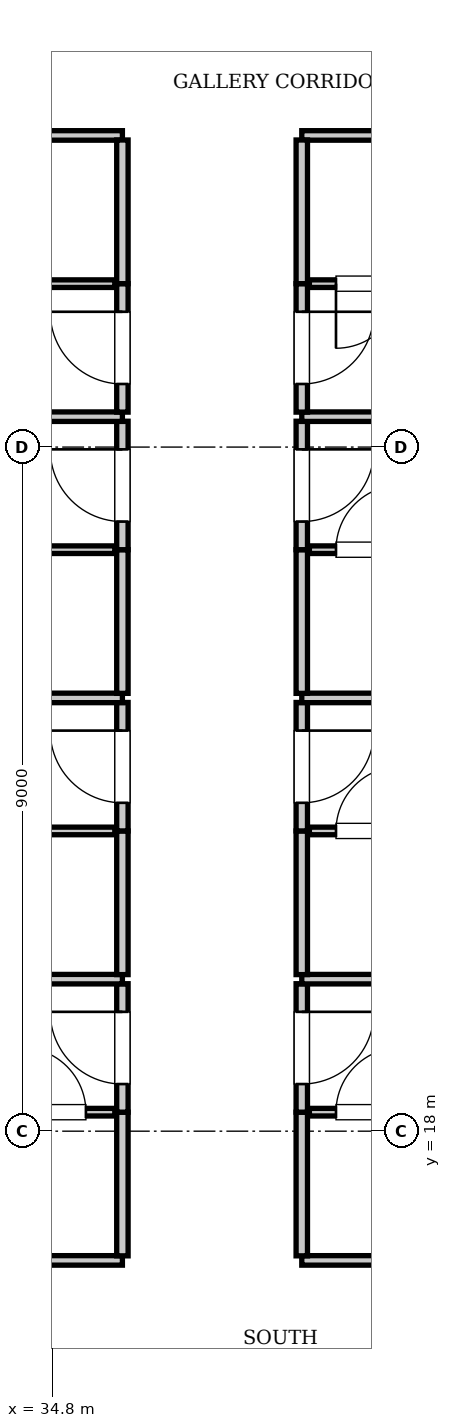
"""IFC4 building model, lengths in metres.
Left out: names, types, materials, properties, quantities, classifications, styles, units other than length and angle.
Written with IfcOpenShell. Run it as: python <this file> out.ifc"""

import sys

from ifc_helpers import new_model, si_unit, direction, frame, frame_2d, origin, place, context, subcontext, project, spatial, rectangle, extrude, element, fill, save


model = new_model("IFC4")
c1 = context("Model", 3, precision=1e-05, world=origin(), true_north=direction((0.0, 1.0)))
c2 = subcontext(c1, "Body", "Model", "MODEL_VIEW")
j1 = project(units=[si_unit("LENGTHUNIT", "METRE"), si_unit("PLANEANGLEUNIT", "RADIAN")], contexts=[c1])
p1 = place(None, origin())
s1 = spatial("IfcSite", under=j1, at=p1, CompositionType="ELEMENT")
p2 = place(p1, origin())
s2 = spatial("IfcBuilding", under=s1, at=p2, CompositionType="ELEMENT")
p3 = place(p2, frame((0.0, 0.0, 185.15)))
s3 = spatial("IfcBuildingStorey", under=s2, at=p3, CompositionType="ELEMENT", Elevation=185.15)
p4 = place(p3, frame((13.2, 16.3, 0.0), z_axis=(0.0, 0.0, 1.0), x_axis=(1.0, 0.0, 0.0)))
e1 = element("IfcWall", 1, at=p4, inside=s3, PredefinedType="PARTITIONING", context=c2, shape_type="SweptSolid", body=[
    extrude(rectangle(XDim=22.52, YDim=0.125, at=frame_2d((11.26, 0.0))), origin(), (0.0, 0.0, 1.0), 3.61),
])
p5 = place(p3, frame((38.08, 16.3, 0.0), z_axis=(0.0, 0.0, 1.0), x_axis=(1.0, 0.0, 0.0)))
e2 = element("IfcWall", 2, at=p5, inside=s3, PredefinedType="PARTITIONING", context=c2, shape_type="SweptSolid", body=[
    extrude(rectangle(XDim=24.32, YDim=0.125, at=frame_2d((12.16, 0.0))), origin(), (0.0, 0.0, 1.0), 3.61),
])
p6 = place(p3, frame((13.2, 31.1, 0.0), z_axis=(0.0, 0.0, 1.0), x_axis=(1.0, 0.0, 0.0)))
e3 = element("IfcWall", 3, at=p6, inside=s3, PredefinedType="PARTITIONING", context=c2, shape_type="SweptSolid", body=[
    extrude(rectangle(XDim=22.52, YDim=0.125, at=frame_2d((11.26, 0.0))), origin(), (0.0, 0.0, 1.0), 3.61),
])
p7 = place(p3, frame((38.08, 31.1, 0.0), z_axis=(0.0, 0.0, 1.0), x_axis=(1.0, 0.0, 0.0)))
e4 = element("IfcWall", 4, at=p7, inside=s3, PredefinedType="PARTITIONING", context=c2, shape_type="SweptSolid", body=[
    extrude(rectangle(XDim=24.32, YDim=0.125, at=frame_2d((12.16, 0.0))), origin(), (0.0, 0.0, 1.0), 3.61),
])
p8 = place(p3, frame((35.72, 16.36, 0.0), z_axis=(0.0, 0.0, 1.0), x_axis=(0.0, 1.0, 0.0)))
e5 = element("IfcWall", 5, at=p8, inside=s3, PredefinedType="PARTITIONING", context=c2, shape_type="SweptSolid", body=[
    extrude(rectangle(XDim=1.89, YDim=0.15, at=frame_2d((0.945, 0.0))), origin(), (0.0, 0.0, 1.0), 3.61),
])
p9 = place(p3, frame((35.72, 18.25, 0.0), z_axis=(0.0, 0.0, 1.0), x_axis=(0.0, 1.0, 0.0)))
e6 = element("IfcWall", 6, at=p9, inside=s3, PredefinedType="PARTITIONING", context=c2, shape_type="SweptSolid", body=[
    extrude(rectangle(XDim=1.69, YDim=0.15, at=frame_2d((0.845, 0.0))), origin(), (0.0, 0.0, 1.0), 3.61),
])
p10 = place(p9, frame((0.37, 0.0, 0.0)))
e7 = element("IfcOpeningElement", 7, at=p10, cuts=e6, PredefinedType="OPENING", context=c2, shape_type="SweptSolid", body=[
    extrude(rectangle(XDim=0.95, YDim=2.15, at=frame_2d((0.475, 1.075))), frame((0.0, 0.085, 0.0), z_axis=(0.0, -1.0, 0.0), x_axis=(1.0, 0.0, 0.0)), (0.0, 0.0, 1.0), 0.17),
])
p11 = place(p3, frame((33.32, 18.25, 0.0), z_axis=(0.0, 0.0, 1.0), x_axis=(1.0, 0.0, 0.0)))
e8 = element("IfcWall", 8, at=p11, inside=s3, PredefinedType="PARTITIONING", context=c2, shape_type="SweptSolid", body=[
    extrude(rectangle(XDim=2.3, YDim=0.1, at=frame_2d((1.15, 0.0))), origin(), (0.0, 0.0, 1.0), 3.61),
])
p12 = place(p11, frame((1.07, 0.0, 0.0)))
e9 = element("IfcOpeningElement", 9, at=p12, cuts=e8, PredefinedType="OPENING", context=c2, shape_type="SweptSolid", body=[
    extrude(rectangle(XDim=0.85, YDim=2.1, at=frame_2d((0.425, 1.05))), frame((0.0, 0.06, 0.0), z_axis=(0.0, -1.0, 0.0), x_axis=(1.0, 0.0, 0.0)), (0.0, 0.0, 1.0), 0.12),
])
p13 = place(p3, frame((38.08, 16.36, 0.0), z_axis=(0.0, 0.0, 1.0), x_axis=(0.0, 1.0, 0.0)))
e10 = element("IfcWall", 10, at=p13, inside=s3, PredefinedType="PARTITIONING", context=c2, shape_type="SweptSolid", body=[
    extrude(rectangle(XDim=1.89, YDim=0.15, at=frame_2d((0.945, 0.0))), origin(), (0.0, 0.0, 1.0), 3.61),
])
p14 = place(p3, frame((38.08, 18.25, 0.0), z_axis=(0.0, 0.0, 1.0), x_axis=(0.0, 1.0, 0.0)))
e11 = element("IfcWall", 11, at=p14, inside=s3, PredefinedType="PARTITIONING", context=c2, shape_type="SweptSolid", body=[
    extrude(rectangle(XDim=1.69, YDim=0.15, at=frame_2d((0.845, 0.0))), origin(), (0.0, 0.0, 1.0), 3.61),
])
p15 = place(p14, frame((0.37, 0.0, 0.0)))
e12 = element("IfcOpeningElement", 12, at=p15, cuts=e11, PredefinedType="OPENING", context=c2, shape_type="SweptSolid", body=[
    extrude(rectangle(XDim=0.95, YDim=2.15, at=frame_2d((0.475, 1.075))), frame((0.0, 0.085, 0.0), z_axis=(0.0, -1.0, 0.0), x_axis=(1.0, 0.0, 0.0)), (0.0, 0.0, 1.0), 0.17),
])
p16 = place(p3, frame((38.18, 18.25, 0.0), z_axis=(0.0, 0.0, 1.0), x_axis=(1.0, 0.0, 0.0)))
e13 = element("IfcWall", 13, at=p16, inside=s3, PredefinedType="PARTITIONING", context=c2, shape_type="SweptSolid", body=[
    extrude(rectangle(XDim=2.3, YDim=0.1, at=frame_2d((1.15, 0.0))), origin(), (0.0, 0.0, 1.0), 3.61),
])
p17 = place(p16, frame((0.35, 0.0, 0.0)))
e14 = element("IfcOpeningElement", 14, at=p17, cuts=e13, PredefinedType="OPENING", context=c2, shape_type="SweptSolid", body=[
    extrude(rectangle(XDim=0.85, YDim=2.1, at=frame_2d((0.425, 1.05))), frame((0.0, 0.06, 0.0), z_axis=(0.0, -1.0, 0.0), x_axis=(1.0, 0.0, 0.0)), (0.0, 0.0, 1.0), 0.12),
])
p18 = place(p3, frame((13.2, 20.0, 0.0), z_axis=(0.0, 0.0, 1.0), x_axis=(1.0, 0.0, 0.0)))
e15 = element("IfcWall", 15, at=p18, inside=s3, PredefinedType="PARTITIONING", context=c2, shape_type="SweptSolid", body=[
    extrude(rectangle(XDim=22.52, YDim=0.125, at=frame_2d((11.26, 0.0))), origin(), (0.0, 0.0, 1.0), 3.61),
])
p19 = place(p3, frame((38.08, 20.0, 0.0), z_axis=(0.0, 0.0, 1.0), x_axis=(1.0, 0.0, 0.0)))
e16 = element("IfcWall", 16, at=p19, inside=s3, PredefinedType="PARTITIONING", context=c2, shape_type="SweptSolid", body=[
    extrude(rectangle(XDim=24.32, YDim=0.125, at=frame_2d((12.16, 0.0))), origin(), (0.0, 0.0, 1.0), 3.61),
])
p20 = place(p3, frame((35.72, 20.06, 0.0), z_axis=(0.0, 0.0, 1.0), x_axis=(0.0, 1.0, 0.0)))
e17 = element("IfcWall", 17, at=p20, inside=s3, PredefinedType="PARTITIONING", context=c2, shape_type="SweptSolid", body=[
    extrude(rectangle(XDim=1.89, YDim=0.15, at=frame_2d((0.945, 0.0))), origin(), (0.0, 0.0, 1.0), 3.61),
])
p21 = place(p3, frame((35.72, 21.95, 0.0), z_axis=(0.0, 0.0, 1.0), x_axis=(0.0, 1.0, 0.0)))
e18 = element("IfcWall", 18, at=p21, inside=s3, PredefinedType="PARTITIONING", context=c2, shape_type="SweptSolid", body=[
    extrude(rectangle(XDim=1.69, YDim=0.15, at=frame_2d((0.845, 0.0))), origin(), (0.0, 0.0, 1.0), 3.61),
])
p22 = place(p21, frame((0.37, 0.0, 0.0)))
e19 = element("IfcOpeningElement", 19, at=p22, cuts=e18, PredefinedType="OPENING", context=c2, shape_type="SweptSolid", body=[
    extrude(rectangle(XDim=0.95, YDim=2.15, at=frame_2d((0.475, 1.075))), frame((0.0, 0.085, 0.0), z_axis=(0.0, -1.0, 0.0), x_axis=(1.0, 0.0, 0.0)), (0.0, 0.0, 1.0), 0.17),
])
p23 = place(p3, frame((33.32, 21.95, 0.0), z_axis=(0.0, 0.0, 1.0), x_axis=(1.0, 0.0, 0.0)))
e20 = element("IfcWall", 20, at=p23, inside=s3, PredefinedType="PARTITIONING", context=c2, shape_type="SweptSolid", body=[
    extrude(rectangle(XDim=2.3, YDim=0.1, at=frame_2d((1.15, 0.0))), origin(), (0.0, 0.0, 1.0), 3.61),
])
p24 = place(p23, frame((0.35, 0.0, 0.0)))
e21 = element("IfcOpeningElement", 21, at=p24, cuts=e20, PredefinedType="OPENING", context=c2, shape_type="SweptSolid", body=[
    extrude(rectangle(XDim=0.85, YDim=2.1, at=frame_2d((0.425, 1.05))), frame((0.0, 0.06, 0.0), z_axis=(0.0, -1.0, 0.0), x_axis=(1.0, 0.0, 0.0)), (0.0, 0.0, 1.0), 0.12),
])
p25 = place(p3, frame((38.08, 20.06, 0.0), z_axis=(0.0, 0.0, 1.0), x_axis=(0.0, 1.0, 0.0)))
e22 = element("IfcWall", 22, at=p25, inside=s3, PredefinedType="PARTITIONING", context=c2, shape_type="SweptSolid", body=[
    extrude(rectangle(XDim=1.89, YDim=0.15, at=frame_2d((0.945, 0.0))), origin(), (0.0, 0.0, 1.0), 3.61),
])
p26 = place(p3, frame((38.08, 21.95, 0.0), z_axis=(0.0, 0.0, 1.0), x_axis=(0.0, 1.0, 0.0)))
e23 = element("IfcWall", 23, at=p26, inside=s3, PredefinedType="PARTITIONING", context=c2, shape_type="SweptSolid", body=[
    extrude(rectangle(XDim=1.69, YDim=0.15, at=frame_2d((0.845, 0.0))), origin(), (0.0, 0.0, 1.0), 3.61),
])
p27 = place(p26, frame((0.37, 0.0, 0.0)))
e24 = element("IfcOpeningElement", 24, at=p27, cuts=e23, PredefinedType="OPENING", context=c2, shape_type="SweptSolid", body=[
    extrude(rectangle(XDim=0.95, YDim=2.15, at=frame_2d((0.475, 1.075))), frame((0.0, 0.085, 0.0), z_axis=(0.0, -1.0, 0.0), x_axis=(1.0, 0.0, 0.0)), (0.0, 0.0, 1.0), 0.17),
])
p28 = place(p3, frame((38.18, 21.95, 0.0), z_axis=(0.0, 0.0, 1.0), x_axis=(1.0, 0.0, 0.0)))
e25 = element("IfcWall", 25, at=p28, inside=s3, PredefinedType="PARTITIONING", context=c2, shape_type="SweptSolid", body=[
    extrude(rectangle(XDim=2.3, YDim=0.1, at=frame_2d((1.15, 0.0))), origin(), (0.0, 0.0, 1.0), 3.61),
])
p29 = place(p28, frame((0.35, 0.0, 0.0)))
e26 = element("IfcOpeningElement", 26, at=p29, cuts=e25, PredefinedType="OPENING", context=c2, shape_type="SweptSolid", body=[
    extrude(rectangle(XDim=0.85, YDim=2.1, at=frame_2d((0.425, 1.05))), frame((0.0, 0.06, 0.0), z_axis=(0.0, -1.0, 0.0), x_axis=(1.0, 0.0, 0.0)), (0.0, 0.0, 1.0), 0.12),
])
p30 = place(p3, frame((13.2, 23.7, 0.0), z_axis=(0.0, 0.0, 1.0), x_axis=(1.0, 0.0, 0.0)))
e27 = element("IfcWall", 27, at=p30, inside=s3, PredefinedType="PARTITIONING", context=c2, shape_type="SweptSolid", body=[
    extrude(rectangle(XDim=22.52, YDim=0.125, at=frame_2d((11.26, 0.0))), origin(), (0.0, 0.0, 1.0), 3.61),
])
p31 = place(p3, frame((38.08, 23.7, 0.0), z_axis=(0.0, 0.0, 1.0), x_axis=(1.0, 0.0, 0.0)))
e28 = element("IfcWall", 28, at=p31, inside=s3, PredefinedType="PARTITIONING", context=c2, shape_type="SweptSolid", body=[
    extrude(rectangle(XDim=24.32, YDim=0.125, at=frame_2d((12.16, 0.0))), origin(), (0.0, 0.0, 1.0), 3.61),
])
p32 = place(p3, frame((35.72, 23.76, 0.0), z_axis=(0.0, 0.0, 1.0), x_axis=(0.0, 1.0, 0.0)))
e29 = element("IfcWall", 29, at=p32, inside=s3, PredefinedType="PARTITIONING", context=c2, shape_type="SweptSolid", body=[
    extrude(rectangle(XDim=1.89, YDim=0.15, at=frame_2d((0.945, 0.0))), origin(), (0.0, 0.0, 1.0), 3.61),
])
p33 = place(p3, frame((35.72, 25.65, 0.0), z_axis=(0.0, 0.0, 1.0), x_axis=(0.0, 1.0, 0.0)))
e30 = element("IfcWall", 30, at=p33, inside=s3, PredefinedType="PARTITIONING", context=c2, shape_type="SweptSolid", body=[
    extrude(rectangle(XDim=1.69, YDim=0.15, at=frame_2d((0.845, 0.0))), origin(), (0.0, 0.0, 1.0), 3.61),
])
p34 = place(p33, frame((0.37, 0.0, 0.0)))
e31 = element("IfcOpeningElement", 31, at=p34, cuts=e30, PredefinedType="OPENING", context=c2, shape_type="SweptSolid", body=[
    extrude(rectangle(XDim=0.95, YDim=2.15, at=frame_2d((0.475, 1.075))), frame((0.0, 0.085, 0.0), z_axis=(0.0, -1.0, 0.0), x_axis=(1.0, 0.0, 0.0)), (0.0, 0.0, 1.0), 0.17),
])
p35 = place(p3, frame((33.32, 25.65, 0.0), z_axis=(0.0, 0.0, 1.0), x_axis=(1.0, 0.0, 0.0)))
e32 = element("IfcWall", 32, at=p35, inside=s3, PredefinedType="PARTITIONING", context=c2, shape_type="SweptSolid", body=[
    extrude(rectangle(XDim=2.3, YDim=0.1, at=frame_2d((1.15, 0.0))), origin(), (0.0, 0.0, 1.0), 3.61),
])
p36 = place(p35, frame((0.35, 0.0, 0.0)))
e33 = element("IfcOpeningElement", 33, at=p36, cuts=e32, PredefinedType="OPENING", context=c2, shape_type="SweptSolid", body=[
    extrude(rectangle(XDim=0.85, YDim=2.1, at=frame_2d((0.425, 1.05))), frame((0.0, 0.06, 0.0), z_axis=(0.0, -1.0, 0.0), x_axis=(1.0, 0.0, 0.0)), (0.0, 0.0, 1.0), 0.12),
])
p37 = place(p3, frame((38.08, 23.76, 0.0), z_axis=(0.0, 0.0, 1.0), x_axis=(0.0, 1.0, 0.0)))
e34 = element("IfcWall", 34, at=p37, inside=s3, PredefinedType="PARTITIONING", context=c2, shape_type="SweptSolid", body=[
    extrude(rectangle(XDim=1.89, YDim=0.15, at=frame_2d((0.945, 0.0))), origin(), (0.0, 0.0, 1.0), 3.61),
])
p38 = place(p3, frame((38.08, 25.65, 0.0), z_axis=(0.0, 0.0, 1.0), x_axis=(0.0, 1.0, 0.0)))
e35 = element("IfcWall", 35, at=p38, inside=s3, PredefinedType="PARTITIONING", context=c2, shape_type="SweptSolid", body=[
    extrude(rectangle(XDim=1.69, YDim=0.15, at=frame_2d((0.845, 0.0))), origin(), (0.0, 0.0, 1.0), 3.61),
])
p39 = place(p38, frame((0.37, 0.0, 0.0)))
e36 = element("IfcOpeningElement", 36, at=p39, cuts=e35, PredefinedType="OPENING", context=c2, shape_type="SweptSolid", body=[
    extrude(rectangle(XDim=0.95, YDim=2.15, at=frame_2d((0.475, 1.075))), frame((0.0, 0.085, 0.0), z_axis=(0.0, -1.0, 0.0), x_axis=(1.0, 0.0, 0.0)), (0.0, 0.0, 1.0), 0.17),
])
p40 = place(p3, frame((38.18, 25.65, 0.0), z_axis=(0.0, 0.0, 1.0), x_axis=(1.0, 0.0, 0.0)))
e37 = element("IfcWall", 37, at=p40, inside=s3, PredefinedType="PARTITIONING", context=c2, shape_type="SweptSolid", body=[
    extrude(rectangle(XDim=2.3, YDim=0.1, at=frame_2d((1.15, 0.0))), origin(), (0.0, 0.0, 1.0), 3.61),
])
p41 = place(p40, frame((0.35, 0.0, 0.0)))
e38 = element("IfcOpeningElement", 38, at=p41, cuts=e37, PredefinedType="OPENING", context=c2, shape_type="SweptSolid", body=[
    extrude(rectangle(XDim=0.85, YDim=2.1, at=frame_2d((0.425, 1.05))), frame((0.0, 0.06, 0.0), z_axis=(0.0, -1.0, 0.0), x_axis=(1.0, 0.0, 0.0)), (0.0, 0.0, 1.0), 0.12),
])
p42 = place(p3, frame((13.2, 27.4, 0.0), z_axis=(0.0, 0.0, 1.0), x_axis=(1.0, 0.0, 0.0)))
e39 = element("IfcWall", 39, at=p42, inside=s3, PredefinedType="PARTITIONING", context=c2, shape_type="SweptSolid", body=[
    extrude(rectangle(XDim=22.52, YDim=0.125, at=frame_2d((11.26, 0.0))), origin(), (0.0, 0.0, 1.0), 3.61),
])
p43 = place(p3, frame((38.08, 27.4, 0.0), z_axis=(0.0, 0.0, 1.0), x_axis=(1.0, 0.0, 0.0)))
e40 = element("IfcWall", 40, at=p43, inside=s3, PredefinedType="PARTITIONING", context=c2, shape_type="SweptSolid", body=[
    extrude(rectangle(XDim=24.32, YDim=0.125, at=frame_2d((12.16, 0.0))), origin(), (0.0, 0.0, 1.0), 3.61),
])
p44 = place(p3, frame((35.72, 27.46, 0.0), z_axis=(0.0, 0.0, 1.0), x_axis=(0.0, 1.0, 0.0)))
e41 = element("IfcWall", 41, at=p44, inside=s3, PredefinedType="PARTITIONING", context=c2, shape_type="SweptSolid", body=[
    extrude(rectangle(XDim=1.69, YDim=0.15, at=frame_2d((0.845, 0.0))), origin(), (0.0, 0.0, 1.0), 3.61),
])
p45 = place(p44, frame((0.37, 0.0, 0.0)))
e42 = element("IfcOpeningElement", 42, at=p45, cuts=e41, PredefinedType="OPENING", context=c2, shape_type="SweptSolid", body=[
    extrude(rectangle(XDim=0.95, YDim=2.15, at=frame_2d((0.475, 1.075))), frame((0.0, 0.085, 0.0), z_axis=(0.0, -1.0, 0.0), x_axis=(1.0, 0.0, 0.0)), (0.0, 0.0, 1.0), 0.17),
])
p46 = place(p3, frame((35.72, 29.15, 0.0), z_axis=(0.0, 0.0, 1.0), x_axis=(0.0, 1.0, 0.0)))
e43 = element("IfcWall", 43, at=p46, inside=s3, PredefinedType="PARTITIONING", context=c2, shape_type="SweptSolid", body=[
    extrude(rectangle(XDim=1.89, YDim=0.15, at=frame_2d((0.945, 0.0))), origin(), (0.0, 0.0, 1.0), 3.61),
])
p47 = place(p3, frame((33.32, 29.15, 0.0), z_axis=(0.0, 0.0, 1.0), x_axis=(1.0, 0.0, 0.0)))
e44 = element("IfcWall", 44, at=p47, inside=s3, PredefinedType="PARTITIONING", context=c2, shape_type="SweptSolid", body=[
    extrude(rectangle(XDim=2.3, YDim=0.1, at=frame_2d((1.15, 0.0))), origin(), (0.0, 0.0, 1.0), 3.61),
])
p48 = place(p47, frame((0.35, 0.0, 0.0)))
e45 = element("IfcOpeningElement", 45, at=p48, cuts=e44, PredefinedType="OPENING", context=c2, shape_type="SweptSolid", body=[
    extrude(rectangle(XDim=0.85, YDim=2.1, at=frame_2d((0.425, 1.05))), frame((0.0, 0.06, 0.0), z_axis=(0.0, -1.0, 0.0), x_axis=(1.0, 0.0, 0.0)), (0.0, 0.0, 1.0), 0.12),
])
p49 = place(p3, frame((38.08, 27.46, 0.0), z_axis=(0.0, 0.0, 1.0), x_axis=(0.0, 1.0, 0.0)))
e46 = element("IfcWall", 46, at=p49, inside=s3, PredefinedType="PARTITIONING", context=c2, shape_type="SweptSolid", body=[
    extrude(rectangle(XDim=1.69, YDim=0.15, at=frame_2d((0.845, 0.0))), origin(), (0.0, 0.0, 1.0), 3.61),
])
p50 = place(p49, frame((0.37, 0.0, 0.0)))
e47 = element("IfcOpeningElement", 47, at=p50, cuts=e46, PredefinedType="OPENING", context=c2, shape_type="SweptSolid", body=[
    extrude(rectangle(XDim=0.95, YDim=2.15, at=frame_2d((0.475, 1.075))), frame((0.0, 0.085, 0.0), z_axis=(0.0, -1.0, 0.0), x_axis=(1.0, 0.0, 0.0)), (0.0, 0.0, 1.0), 0.17),
])
p51 = place(p3, frame((38.08, 29.15, 0.0), z_axis=(0.0, 0.0, 1.0), x_axis=(0.0, 1.0, 0.0)))
e48 = element("IfcWall", 48, at=p51, inside=s3, PredefinedType="PARTITIONING", context=c2, shape_type="SweptSolid", body=[
    extrude(rectangle(XDim=1.89, YDim=0.15, at=frame_2d((0.945, 0.0))), origin(), (0.0, 0.0, 1.0), 3.61),
])
p52 = place(p3, frame((38.18, 29.15, 0.0), z_axis=(0.0, 0.0, 1.0), x_axis=(1.0, 0.0, 0.0)))
e49 = element("IfcWall", 49, at=p52, inside=s3, PredefinedType="PARTITIONING", context=c2, shape_type="SweptSolid", body=[
    extrude(rectangle(XDim=2.3, YDim=0.1, at=frame_2d((1.15, 0.0))), origin(), (0.0, 0.0, 1.0), 3.61),
])
p53 = place(p52, frame((0.35, 0.0, 0.0)))
e50 = element("IfcOpeningElement", 50, at=p53, cuts=e49, PredefinedType="OPENING", context=c2, shape_type="SweptSolid", body=[
    extrude(rectangle(XDim=0.85, YDim=2.1, at=frame_2d((0.425, 1.05))), frame((0.0, 0.06, 0.0), z_axis=(0.0, -1.0, 0.0), x_axis=(1.0, 0.0, 0.0)), (0.0, 0.0, 1.0), 0.12),
])
p54 = place(p12, origin())
e51 = element("IfcDoor", 51, at=p54, inside=s3, OperationType="SINGLE_SWING_LEFT", PredefinedType="DOOR", context=c2, shape_type="SweptSolid", body=[
    extrude(rectangle(XDim=0.85, YDim=2.1, at=frame_2d((0.425, 1.05))), frame((0.0, 0.025, 0.0), z_axis=(0.0, -1.0, 0.0), x_axis=(1.0, 0.0, 0.0)), (0.0, 0.0, 1.0), 0.05),
])
fill(e9, e51)
p55 = place(p10, origin())
e52 = element("IfcDoor", 52, at=p55, inside=s3, OperationType="SINGLE_SWING_RIGHT", PredefinedType="DOOR", context=c2, shape_type="SweptSolid", body=[
    extrude(rectangle(XDim=0.95, YDim=2.15, at=frame_2d((0.475, 1.075))), frame((0.0, 0.025, 0.0), z_axis=(0.0, -1.0, 0.0), x_axis=(1.0, 0.0, 0.0)), (0.0, 0.0, 1.0), 0.05),
])
fill(e7, e52)
p56 = place(p17, origin())
e53 = element("IfcDoor", 53, at=p56, inside=s3, OperationType="SINGLE_SWING_RIGHT", PredefinedType="DOOR", context=c2, shape_type="SweptSolid", body=[
    extrude(rectangle(XDim=0.85, YDim=2.1, at=frame_2d((0.425, 1.05))), frame((0.0, 0.025, 0.0), z_axis=(0.0, -1.0, 0.0), x_axis=(1.0, 0.0, 0.0)), (0.0, 0.0, 1.0), 0.05),
])
fill(e14, e53)
p57 = place(p15, frame((0.95, 0.0, 0.0), z_axis=(0.0, 0.0, 1.0), x_axis=(-1.0, 0.0, 0.0)))
e54 = element("IfcDoor", 54, at=p57, inside=s3, OperationType="SINGLE_SWING_LEFT", PredefinedType="DOOR", context=c2, shape_type="SweptSolid", body=[
    extrude(rectangle(XDim=0.95, YDim=2.15, at=frame_2d((0.475, 1.075))), frame((0.0, 0.025, 0.0), z_axis=(0.0, -1.0, 0.0), x_axis=(1.0, 0.0, 0.0)), (0.0, 0.0, 1.0), 0.05),
])
fill(e12, e54)
p58 = place(p22, origin())
e55 = element("IfcDoor", 55, at=p58, inside=s3, OperationType="SINGLE_SWING_RIGHT", PredefinedType="DOOR", context=c2, shape_type="SweptSolid", body=[
    extrude(rectangle(XDim=0.95, YDim=2.15, at=frame_2d((0.475, 1.075))), frame((0.0, 0.025, 0.0), z_axis=(0.0, -1.0, 0.0), x_axis=(1.0, 0.0, 0.0)), (0.0, 0.0, 1.0), 0.05),
])
fill(e19, e55)
p59 = place(p29, origin())
e56 = element("IfcDoor", 56, at=p59, inside=s3, OperationType="SINGLE_SWING_RIGHT", PredefinedType="DOOR", context=c2, shape_type="SweptSolid", body=[
    extrude(rectangle(XDim=0.85, YDim=2.1, at=frame_2d((0.425, 1.05))), frame((0.0, 0.025, 0.0), z_axis=(0.0, -1.0, 0.0), x_axis=(1.0, 0.0, 0.0)), (0.0, 0.0, 1.0), 0.05),
])
fill(e26, e56)
p60 = place(p27, frame((0.95, 0.0, 0.0), z_axis=(0.0, 0.0, 1.0), x_axis=(-1.0, 0.0, 0.0)))
e57 = element("IfcDoor", 57, at=p60, inside=s3, OperationType="SINGLE_SWING_LEFT", PredefinedType="DOOR", context=c2, shape_type="SweptSolid", body=[
    extrude(rectangle(XDim=0.95, YDim=2.15, at=frame_2d((0.475, 1.075))), frame((0.0, 0.025, 0.0), z_axis=(0.0, -1.0, 0.0), x_axis=(1.0, 0.0, 0.0)), (0.0, 0.0, 1.0), 0.05),
])
fill(e24, e57)
p61 = place(p34, origin())
e58 = element("IfcDoor", 58, at=p61, inside=s3, OperationType="SINGLE_SWING_RIGHT", PredefinedType="DOOR", context=c2, shape_type="SweptSolid", body=[
    extrude(rectangle(XDim=0.95, YDim=2.15, at=frame_2d((0.475, 1.075))), frame((0.0, 0.025, 0.0), z_axis=(0.0, -1.0, 0.0), x_axis=(1.0, 0.0, 0.0)), (0.0, 0.0, 1.0), 0.05),
])
fill(e31, e58)
p62 = place(p41, origin())
e59 = element("IfcDoor", 59, at=p62, inside=s3, OperationType="SINGLE_SWING_RIGHT", PredefinedType="DOOR", context=c2, shape_type="SweptSolid", body=[
    extrude(rectangle(XDim=0.85, YDim=2.1, at=frame_2d((0.425, 1.05))), frame((0.0, 0.025, 0.0), z_axis=(0.0, -1.0, 0.0), x_axis=(1.0, 0.0, 0.0)), (0.0, 0.0, 1.0), 0.05),
])
fill(e38, e59)
p63 = place(p39, frame((0.95, 0.0, 0.0), z_axis=(0.0, 0.0, 1.0), x_axis=(-1.0, 0.0, 0.0)))
e60 = element("IfcDoor", 60, at=p63, inside=s3, OperationType="SINGLE_SWING_LEFT", PredefinedType="DOOR", context=c2, shape_type="SweptSolid", body=[
    extrude(rectangle(XDim=0.95, YDim=2.15, at=frame_2d((0.475, 1.075))), frame((0.0, 0.025, 0.0), z_axis=(0.0, -1.0, 0.0), x_axis=(1.0, 0.0, 0.0)), (0.0, 0.0, 1.0), 0.05),
])
fill(e36, e60)
p64 = place(p45, origin())
e61 = element("IfcDoor", 61, at=p64, inside=s3, OperationType="SINGLE_SWING_RIGHT", PredefinedType="DOOR", context=c2, shape_type="SweptSolid", body=[
    extrude(rectangle(XDim=0.95, YDim=2.15, at=frame_2d((0.475, 1.075))), frame((0.0, 0.025, 0.0), z_axis=(0.0, -1.0, 0.0), x_axis=(1.0, 0.0, 0.0)), (0.0, 0.0, 1.0), 0.05),
])
fill(e42, e61)
p65 = place(p53, frame((0.85, 0.0, 0.0), z_axis=(0.0, 0.0, 1.0), x_axis=(-1.0, 0.0, 0.0)))
e62 = element("IfcDoor", 62, at=p65, inside=s3, OperationType="SINGLE_SWING_RIGHT", PredefinedType="DOOR", context=c2, shape_type="SweptSolid", body=[
    extrude(rectangle(XDim=0.85, YDim=2.1, at=frame_2d((0.425, 1.05))), frame((0.0, 0.025, 0.0), z_axis=(0.0, -1.0, 0.0), x_axis=(1.0, 0.0, 0.0)), (0.0, 0.0, 1.0), 0.05),
])
fill(e50, e62)
p66 = place(p50, frame((0.95, 0.0, 0.0), z_axis=(0.0, 0.0, 1.0), x_axis=(-1.0, 0.0, 0.0)))
e63 = element("IfcDoor", 63, at=p66, inside=s3, OperationType="SINGLE_SWING_LEFT", PredefinedType="DOOR", context=c2, shape_type="SweptSolid", body=[
    extrude(rectangle(XDim=0.95, YDim=2.15, at=frame_2d((0.475, 1.075))), frame((0.0, 0.025, 0.0), z_axis=(0.0, -1.0, 0.0), x_axis=(1.0, 0.0, 0.0)), (0.0, 0.0, 1.0), 0.05),
])
fill(e47, e63)
save(model, sys.argv[1])
